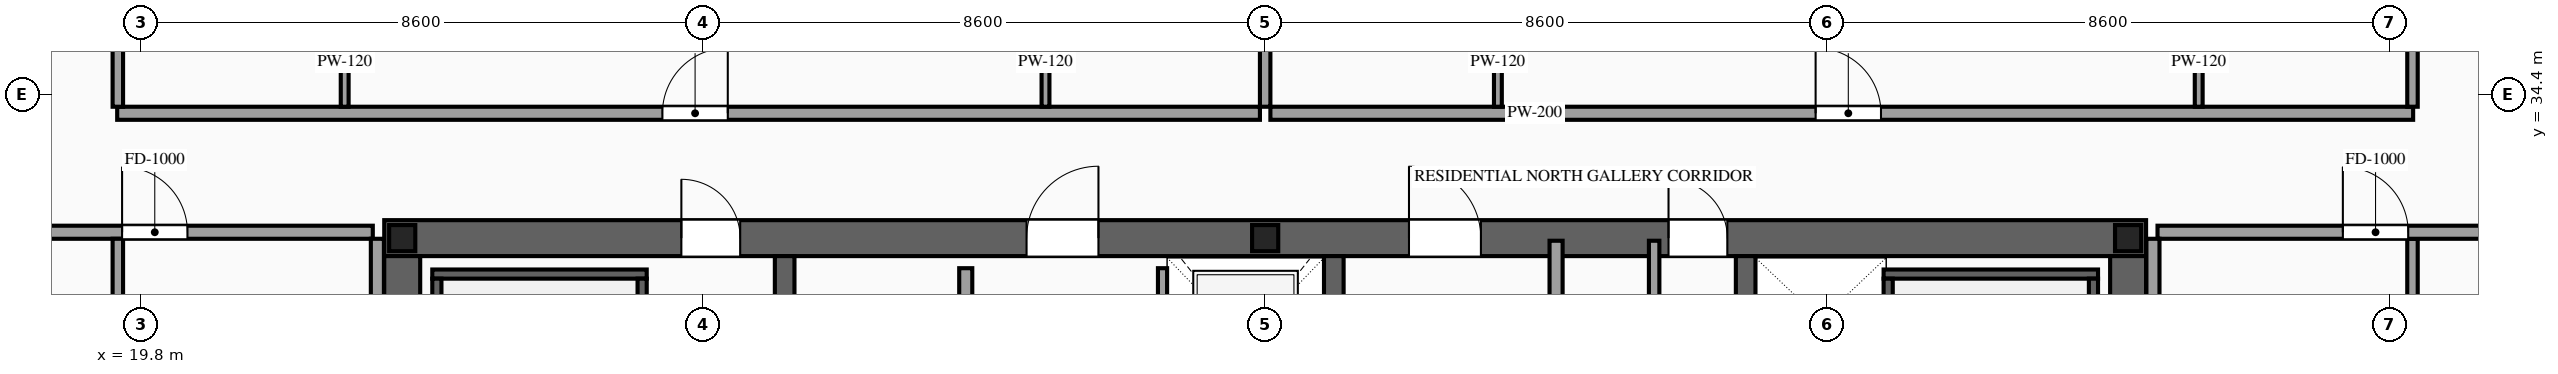
"""IFC4 building model, lengths in metres.
Left out: names, types, materials, properties, quantities, classifications, styles, units other than length and angle.
Written with IfcOpenShell. Run it as: python <this file> out.ifc"""

import sys

from ifc_helpers import new_model, si_unit, direction, frame, frame_2d, origin, origin_2d, place, context, subcontext, project, spatial, rectangle, i_section, extrude, source, transform, mapped, element, fill, save


model = new_model("IFC4")
c1 = context("Model", 3, precision=1e-05, world=origin(), true_north=direction((0.0, 1.0)))
c2 = subcontext(c1, "Body", "Model", "MODEL_VIEW")
j1 = project(units=[si_unit("LENGTHUNIT", "METRE"), si_unit("PLANEANGLEUNIT", "RADIAN")], contexts=[c1])
p1 = place(None, origin())
s1 = spatial("IfcSite", under=j1, at=p1, CompositionType="ELEMENT")
p2 = place(p1, origin())
s2 = spatial("IfcBuilding", under=s1, at=p2, CompositionType="ELEMENT")
p3 = place(p2, frame((0.0, 0.0, 224.1)))
s3 = spatial("IfcBuildingStorey", under=s2, at=p3, CompositionType="ELEMENT", Elevation=224.1)
p4 = place(p3, frame((23.525, 32.2, 0.0), z_axis=(0.0, 0.0, 1.0), x_axis=(1.0, 0.0, 0.0)))
e1 = element("IfcWall", 1, at=p4, inside=s3, PredefinedType="SHEAR", context=c2, shape_type="SweptSolid", body=[
    extrude(rectangle(XDim=26.95, YDim=0.55, at=frame_2d((13.475, 0.0))), origin(), (0.0, 0.0, 1.0), 3.5),
])
p5 = place(p4, frame((4.545, 0.0, 0.0)))
e2 = element("IfcOpeningElement", 2, at=p5, cuts=e1, PredefinedType="OPENING", context=c2, shape_type="SweptSolid", body=[
    extrude(rectangle(XDim=0.9, YDim=2.15, at=frame_2d((0.45, 1.075))), frame((0.0, 0.29, 0.0), z_axis=(0.0, -1.0, 0.0), x_axis=(1.0, 0.0, 0.0)), (0.0, 0.0, 1.0), 0.58),
])
p6 = place(p4, frame((9.825, 0.0, 0.0)))
e3 = element("IfcOpeningElement", 3, at=p6, cuts=e1, PredefinedType="OPENING", context=c2, shape_type="SweptSolid", body=[
    extrude(rectangle(XDim=1.1, YDim=2.2, at=frame_2d((0.55, 1.1))), frame((0.0, 0.29, 0.0), z_axis=(0.0, -1.0, 0.0), x_axis=(1.0, 0.0, 0.0)), (0.0, 0.0, 1.0), 0.58),
])
p7 = place(p4, frame((15.675, 0.0, 0.0)))
e4 = element("IfcOpeningElement", 4, at=p7, cuts=e1, PredefinedType="OPENING", context=c2, shape_type="SweptSolid", body=[
    extrude(rectangle(XDim=1.1, YDim=2.2, at=frame_2d((0.55, 1.1))), frame((0.0, 0.29, 0.0), z_axis=(0.0, -1.0, 0.0), x_axis=(1.0, 0.0, 0.0)), (0.0, 0.0, 1.0), 0.58),
])
p8 = place(p4, frame((19.645, 0.0, 0.0)))
e5 = element("IfcOpeningElement", 5, at=p8, cuts=e1, PredefinedType="OPENING", context=c2, shape_type="SweptSolid", body=[
    extrude(rectangle(XDim=0.9, YDim=2.15, at=frame_2d((0.45, 1.075))), frame((0.0, 0.29, 0.0), z_axis=(0.0, -1.0, 0.0), x_axis=(1.0, 0.0, 0.0)), (0.0, 0.0, 1.0), 0.58),
])
m1 = source(origin(), c2, "Body", "SweptSolid", [
    extrude(rectangle(XDim=12.25, YDim=0.55, at=frame_2d((6.125, 0.0))), origin(), (0.0, 0.0, 1.0), 3.5),
])
for number, where, z_axis, x_axis in (
    (6, (23.8, 19.675, 0.0), (0.0, 0.0, 1.0), (0.0, 1.0, 0.0)),
    (7, (50.2, 19.675, 0.0), (0.0, 0.0, 1.0), (0.0, 1.0, 0.0)),
):
    element("IfcWall", number, at=place(p3, frame(where, z_axis=z_axis, x_axis=x_axis)), inside=s3, PredefinedType="SHEAR", context=c2, shape_type="MappedRepresentation", body=[
        mapped(m1, transform((0.0, 0.0, 0.0), scale=1.0)),
    ])
m2 = source(origin(), c2, "Body", "SweptSolid", [
    extrude(rectangle(XDim=12.25, YDim=0.3, at=frame_2d((6.125, 0.0))), origin(), (0.0, 0.0, 1.0), 3.5),
])
for number, where, z_axis, x_axis in (
    (8, (29.65, 19.675, 0.0), (0.0, 0.0, 1.0), (0.0, 1.0, 0.0)),
    (9, (38.05, 19.675, 0.0), (0.0, 0.0, 1.0), (0.0, 1.0, 0.0)),
    (10, (44.35, 19.675, 0.0), (0.0, 0.0, 1.0), (0.0, 1.0, 0.0)),
):
    element("IfcWall", number, at=place(p3, frame(where, z_axis=z_axis, x_axis=x_axis)), inside=s3, PredefinedType="SOLIDWALL", context=c2, shape_type="MappedRepresentation", body=[
        mapped(m2, transform((0.0, 0.0, 0.0), scale=1.0)),
    ])
m3 = source(origin(), c2, "Body", "SweptSolid", [
    extrude(i_section(OverallWidth=0.4, OverallDepth=0.4, WebThickness=0.013, FlangeThickness=0.021, at=origin_2d()), origin(), (0.0, 0.0, 1.0), 3.5),
])
for number, where, z_axis, x_axis in (
    (11, (23.8, 32.2, 0.0), (0.0, 0.0, 1.0), (1.0, 0.0, 0.0)),
    (12, (37.0, 32.2, 0.0), (0.0, 0.0, 1.0), (1.0, 0.0, 0.0)),
    (13, (50.2, 32.2, 0.0), (0.0, 0.0, 1.0), (1.0, 0.0, 0.0)),
):
    element("IfcColumn", number, at=place(p3, frame(where, z_axis=z_axis, x_axis=x_axis)), inside=s3, PredefinedType="COLUMN", context=c2, shape_type="MappedRepresentation", body=[
        mapped(m3, transform((0.0, 0.0, 0.0), scale=1.0)),
    ])
p9 = place(p3, frame((35.43, 29.4, 0.0), z_axis=(0.0, 0.0, 1.0), x_axis=(0.0, 1.0, 0.0)))
e14 = element("IfcWall", 14, at=p9, inside=s3, PredefinedType="SOLIDWALL", context=c2, shape_type="SweptSolid", body=[
    extrude(rectangle(XDim=2.34, YDim=0.14, at=frame_2d((1.17, 0.0))), origin(), (0.0, 0.0, 1.0), 3.28),
])
p10 = place(p9, frame((0.62, 0.0, 0.0)))
e15 = element("IfcOpeningElement", 15, at=p10, cuts=e14, PredefinedType="OPENING", context=c2, shape_type="SweptSolid", body=[
    extrude(rectangle(XDim=1.1, YDim=2.2, at=frame_2d((0.55, 1.1))), frame((0.0, 0.085, 0.0), z_axis=(0.0, -1.0, 0.0), x_axis=(1.0, 0.0, 0.0)), (0.0, 0.0, 1.0), 0.17),
])
m4 = source(origin(), c2, "Body", "SweptSolid", [
    extrude(rectangle(XDim=3.28, YDim=0.14, at=frame_2d((1.64, 0.0))), origin(), (0.0, 0.0, 1.0), 3.28),
])
p11 = place(p3, frame((24.26, 31.65, 0.0), z_axis=(0.0, 0.0, 1.0), x_axis=(1.0, 0.0, 0.0)))
e16 = element("IfcWall", 16, at=p11, inside=s3, PredefinedType="SOLIDWALL", context=c2, shape_type="MappedRepresentation", body=[
    mapped(m4, transform((0.0, 0.0, 0.0), scale=1.0)),
])
m5 = source(origin(), c2, "Body", "SweptSolid", [
    extrude(rectangle(XDim=8.94, YDim=0.14, at=frame_2d((4.47, 0.0))), origin(), (0.0, 0.0, 1.0), 3.28),
])
for number, where, z_axis, x_axis in (
    (17, (24.33, 22.64, 0.0), (0.0, 0.0, 1.0), (0.0, 1.0, 0.0)),
    (18, (27.47, 22.64, 0.0), (0.0, 0.0, 1.0), (0.0, 1.0, 0.0)),
):
    element("IfcWall", number, at=place(p3, frame(where, z_axis=z_axis, x_axis=x_axis)), inside=s3, PredefinedType="SOLIDWALL", context=c2, shape_type="MappedRepresentation", body=[
        mapped(m5, transform((0.0, 0.0, 0.0), scale=1.0)),
    ])
p12 = place(p3, frame((46.46, 31.65, 0.0), z_axis=(0.0, 0.0, 1.0), x_axis=(1.0, 0.0, 0.0)))
e19 = element("IfcWall", 19, at=p12, inside=s3, PredefinedType="SOLIDWALL", context=c2, shape_type="MappedRepresentation", body=[
    mapped(m4, transform((0.0, 0.0, 0.0), scale=1.0)),
])
for number, where, z_axis, x_axis in (
    (20, (46.53, 22.64, 0.0), (0.0, 0.0, 1.0), (0.0, 1.0, 0.0)),
    (21, (49.67, 22.64, 0.0), (0.0, 0.0, 1.0), (0.0, 1.0, 0.0)),
):
    element("IfcWall", number, at=place(p3, frame(where, z_axis=z_axis, x_axis=x_axis)), inside=s3, PredefinedType="SOLIDWALL", context=c2, shape_type="MappedRepresentation", body=[
        mapped(m5, transform((0.0, 0.0, 0.0), scale=1.0)),
    ])
p13 = place(p3, frame((32.42, 25.92, 0.0), z_axis=(0.0, 0.0, 1.0), x_axis=(0.0, 1.0, 0.0)))
e22 = element("IfcWall", 22, at=p13, inside=s3, PredefinedType="PARTITIONING", context=c2, shape_type="SweptSolid", body=[
    extrude(rectangle(XDim=5.82, YDim=0.2, at=frame_2d((2.91, 0.0))), origin(), (0.0, 0.0, 1.0), 3.28),
])
p14 = place(p13, frame((2.46, 0.0, 0.0)))
e23 = element("IfcOpeningElement", 23, at=p14, cuts=e22, PredefinedType="OPENING", context=c2, shape_type="SweptSolid", body=[
    extrude(rectangle(XDim=0.9, YDim=2.15, at=frame_2d((0.45, 1.075))), frame((0.0, 0.115, 0.0), z_axis=(0.0, -1.0, 0.0), x_axis=(1.0, 0.0, 0.0)), (0.0, 0.0, 1.0), 0.23),
])
m6 = source(origin(), c2, "Body", "SweptSolid", [
    extrude(rectangle(XDim=12.72, YDim=0.2, at=frame_2d((6.36, 0.0))), origin(), (0.0, 0.0, 1.0), 3.28),
])
p15 = place(p3, frame((41.45, 19.44, 0.0), z_axis=(0.0, 0.0, 1.0), x_axis=(0.0, 1.0, 0.0)))
e24 = element("IfcWall", 24, at=p15, inside=s3, PredefinedType="PARTITIONING", context=c2, shape_type="MappedRepresentation", body=[
    mapped(m6, transform((0.0, 0.0, 0.0), scale=1.0)),
])
m7 = source(origin(), c2, "Body", "SweptSolid", [
    extrude(rectangle(XDim=10.72, YDim=0.16, at=frame_2d((5.36, 0.0))), origin(), (0.0, 0.0, 1.0), 3.28),
])
p16 = place(p3, frame((42.95, 21.44, 0.0), z_axis=(0.0, 0.0, 1.0), x_axis=(0.0, 1.0, 0.0)))
e25 = element("IfcWall", 25, at=p16, inside=s3, PredefinedType="PARTITIONING", context=c2, shape_type="MappedRepresentation", body=[
    mapped(m7, transform((0.0, 0.0, 0.0), scale=1.0)),
])
p17 = place(p3, frame((19.44, 34.11, 0.0), z_axis=(0.0, 0.0, 1.0), x_axis=(1.0, 0.0, 0.0)))
e26 = element("IfcWall", 26, at=p17, inside=s3, PredefinedType="PARTITIONING", context=c2, shape_type="SweptSolid", body=[
    extrude(rectangle(XDim=17.48, YDim=0.2, at=frame_2d((8.74, 0.0))), origin(), (0.0, 0.0, 1.0), 3.28),
])
p18 = place(p17, frame((8.34, 0.0, 0.0)))
e27 = element("IfcOpeningElement", 27, at=p18, cuts=e26, PredefinedType="OPENING", context=c2, shape_type="SweptSolid", body=[
    extrude(rectangle(XDim=1.0, YDim=2.2, at=frame_2d((0.5, 1.1))), frame((0.0, 0.115, 0.0), z_axis=(0.0, -1.0, 0.0), x_axis=(1.0, 0.0, 0.0)), (0.0, 0.0, 1.0), 0.23),
])
m8 = source(origin(), c2, "Body", "SweptSolid", [
    extrude(rectangle(XDim=12.04, YDim=0.16, at=frame_2d((6.02, 0.0))), origin(), (0.0, 0.0, 1.0), 2.787),
])
p19 = place(p3, frame((37.0, 34.21, 0.0), z_axis=(0.0, 0.0, 1.0), x_axis=(0.0, 1.0, 0.0)))
e28 = element("IfcWall", 28, at=p19, inside=s3, PredefinedType="PARTITIONING", context=c2, shape_type="MappedRepresentation", body=[
    mapped(m8, transform((0.0, 0.0, 0.0), scale=1.0)),
])
p20 = place(p3, frame((22.92, 34.21, 0.0), z_axis=(0.0, 0.0, 1.0), x_axis=(0.0, 1.0, 0.0)))
e29 = element("IfcWall", 29, at=p20, inside=s3, PredefinedType="PARTITIONING", context=c2, shape_type="SweptSolid", body=[
    extrude(rectangle(XDim=4.11, YDim=0.12, at=frame_2d((2.055, 0.0))), origin(), (0.0, 0.0, 1.0), 3.28),
])
p21 = place(p20, frame((1.63, 0.0, 0.0)))
e30 = element("IfcOpeningElement", 30, at=p21, cuts=e29, PredefinedType="OPENING", context=c2, shape_type="SweptSolid", body=[
    extrude(rectangle(XDim=0.85, YDim=2.1, at=frame_2d((0.425, 1.05))), frame((0.0, 0.075, 0.0), z_axis=(0.0, -1.0, 0.0), x_axis=(1.0, 0.0, 0.0)), (0.0, 0.0, 1.0), 0.15),
])
p22 = place(p3, frame((33.64, 34.21, 0.0), z_axis=(0.0, 0.0, 1.0), x_axis=(0.0, 1.0, 0.0)))
e31 = element("IfcWall", 31, at=p22, inside=s3, PredefinedType="PARTITIONING", context=c2, shape_type="SweptSolid", body=[
    extrude(rectangle(XDim=4.11, YDim=0.12, at=frame_2d((2.055, 0.0))), origin(), (0.0, 0.0, 1.0), 3.28),
])
p23 = place(p22, frame((1.63, 0.0, 0.0)))
e32 = element("IfcOpeningElement", 32, at=p23, cuts=e31, PredefinedType="OPENING", context=c2, shape_type="SweptSolid", body=[
    extrude(rectangle(XDim=0.85, YDim=2.1, at=frame_2d((0.425, 1.05))), frame((0.0, 0.075, 0.0), z_axis=(0.0, -1.0, 0.0), x_axis=(1.0, 0.0, 0.0)), (0.0, 0.0, 1.0), 0.15),
])
p24 = place(p3, frame((37.08, 34.11, 0.0), z_axis=(0.0, 0.0, 1.0), x_axis=(1.0, 0.0, 0.0)))
e33 = element("IfcWall", 33, at=p24, inside=s3, PredefinedType="PARTITIONING", context=c2, shape_type="SweptSolid", body=[
    extrude(rectangle(XDim=17.48, YDim=0.2, at=frame_2d((8.74, 0.0))), origin(), (0.0, 0.0, 1.0), 3.28),
])
p25 = place(p24, frame((8.34, 0.0, 0.0)))
e34 = element("IfcOpeningElement", 34, at=p25, cuts=e33, PredefinedType="OPENING", context=c2, shape_type="SweptSolid", body=[
    extrude(rectangle(XDim=1.0, YDim=2.2, at=frame_2d((0.5, 1.1))), frame((0.0, 0.115, 0.0), z_axis=(0.0, -1.0, 0.0), x_axis=(1.0, 0.0, 0.0)), (0.0, 0.0, 1.0), 0.23),
])
m9 = source(origin(), c2, "Body", "SweptSolid", [
    extrude(rectangle(XDim=11.89, YDim=0.16, at=frame_2d((5.945, 0.0))), origin(), (0.0, 0.0, 1.0), 3.28),
])
for number, where, z_axis, x_axis in (
    (35, (19.45, 34.21, 0.0), (0.0, 0.0, 1.0), (0.0, 1.0, 0.0)),
    (36, (54.55, 34.21, 0.0), (0.0, 0.0, 1.0), (0.0, 1.0, 0.0)),
):
    element("IfcWall", number, at=place(p3, frame(where, z_axis=z_axis, x_axis=x_axis)), inside=s3, PredefinedType="PARTITIONING", context=c2, shape_type="MappedRepresentation", body=[
        mapped(m9, transform((0.0, 0.0, 0.0), scale=1.0)),
    ])
p26 = place(p3, frame((40.56, 34.21, 0.0), z_axis=(0.0, 0.0, 1.0), x_axis=(0.0, 1.0, 0.0)))
e37 = element("IfcWall", 37, at=p26, inside=s3, PredefinedType="PARTITIONING", context=c2, shape_type="SweptSolid", body=[
    extrude(rectangle(XDim=4.11, YDim=0.12, at=frame_2d((2.055, 0.0))), origin(), (0.0, 0.0, 1.0), 3.28),
])
p27 = place(p26, frame((1.63, 0.0, 0.0)))
e38 = element("IfcOpeningElement", 38, at=p27, cuts=e37, PredefinedType="OPENING", context=c2, shape_type="SweptSolid", body=[
    extrude(rectangle(XDim=0.85, YDim=2.1, at=frame_2d((0.425, 1.05))), frame((0.0, 0.075, 0.0), z_axis=(0.0, -1.0, 0.0), x_axis=(1.0, 0.0, 0.0)), (0.0, 0.0, 1.0), 0.15),
])
p28 = place(p3, frame((51.28, 34.21, 0.0), z_axis=(0.0, 0.0, 1.0), x_axis=(0.0, 1.0, 0.0)))
e39 = element("IfcWall", 39, at=p28, inside=s3, PredefinedType="PARTITIONING", context=c2, shape_type="SweptSolid", body=[
    extrude(rectangle(XDim=4.11, YDim=0.12, at=frame_2d((2.055, 0.0))), origin(), (0.0, 0.0, 1.0), 3.28),
])
p29 = place(p28, frame((1.63, 0.0, 0.0)))
e40 = element("IfcOpeningElement", 40, at=p29, cuts=e39, PredefinedType="OPENING", context=c2, shape_type="SweptSolid", body=[
    extrude(rectangle(XDim=0.85, YDim=2.1, at=frame_2d((0.425, 1.05))), frame((0.0, 0.075, 0.0), z_axis=(0.0, -1.0, 0.0), x_axis=(1.0, 0.0, 0.0)), (0.0, 0.0, 1.0), 0.15),
])
p30 = place(p3, frame((16.55, 32.29, 0.0), z_axis=(0.0, 0.0, 1.0), x_axis=(1.0, 0.0, 0.0)))
e41 = element("IfcWall", 41, at=p30, inside=s3, PredefinedType="PARTITIONING", context=c2, shape_type="SweptSolid", body=[
    extrude(rectangle(XDim=6.8, YDim=0.2, at=frame_2d((3.4, 0.0))), origin(), (0.0, 0.0, 1.0), 2.825),
])
p31 = place(p30, frame((2.965, 0.0, 0.0)))
e42 = element("IfcOpeningElement", 42, at=p31, cuts=e41, PredefinedType="OPENING", context=c2, shape_type="SweptSolid", body=[
    extrude(rectangle(XDim=1.0, YDim=2.2, at=frame_2d((0.5, 1.1))), frame((0.0, 0.115, 0.0), z_axis=(0.0, -1.0, 0.0), x_axis=(1.0, 0.0, 0.0)), (0.0, 0.0, 1.0), 0.23),
])
m10 = source(origin(), c2, "Body", "SweptSolid", [
    extrude(rectangle(XDim=26.69, YDim=0.16, at=frame_2d((13.345, 0.0))), origin(), (0.0, 0.0, 1.0), 3.28),
])
for number, where, z_axis, x_axis in (
    (43, (19.45, 5.5, 0.0), (0.0, 0.0, 1.0), (0.0, 1.0, 0.0)),
    (44, (54.55, 5.5, 0.0), (0.0, 0.0, 1.0), (0.0, 1.0, 0.0)),
):
    element("IfcWall", number, at=place(p3, frame(where, z_axis=z_axis, x_axis=x_axis)), inside=s3, PredefinedType="PARTITIONING", context=c2, shape_type="MappedRepresentation", body=[
        mapped(m10, transform((0.0, 0.0, 0.0), scale=1.0)),
    ])
m11 = source(origin(), c2, "Body", "SweptSolid", [
    extrude(rectangle(XDim=6.29, YDim=0.2, at=frame_2d((3.145, 0.0))), origin(), (0.0, 0.0, 1.0), 3.28),
])
p32 = place(p3, frame((23.42, 25.9, 0.0), z_axis=(0.0, 0.0, 1.0), x_axis=(0.0, 1.0, 0.0)))
e45 = element("IfcWall", 45, at=p32, inside=s3, PredefinedType="PARTITIONING", context=c2, shape_type="MappedRepresentation", body=[
    mapped(m11, transform((0.0, 0.0, 0.0), scale=1.0)),
])
p33 = place(p3, frame((50.65, 32.29, 0.0), z_axis=(0.0, 0.0, 1.0), x_axis=(1.0, 0.0, 0.0)))
e46 = element("IfcWall", 46, at=p33, inside=s3, PredefinedType="PARTITIONING", context=c2, shape_type="SweptSolid", body=[
    extrude(rectangle(XDim=6.8, YDim=0.2, at=frame_2d((3.4, 0.0))), origin(), (0.0, 0.0, 1.0), 2.825),
])
p34 = place(p33, frame((2.835, 0.0, 0.0)))
e47 = element("IfcOpeningElement", 47, at=p34, cuts=e46, PredefinedType="OPENING", context=c2, shape_type="SweptSolid", body=[
    extrude(rectangle(XDim=1.0, YDim=2.2, at=frame_2d((0.5, 1.1))), frame((0.0, 0.115, 0.0), z_axis=(0.0, -1.0, 0.0), x_axis=(1.0, 0.0, 0.0)), (0.0, 0.0, 1.0), 0.23),
])
p35 = place(p3, frame((50.58, 25.9, 0.0), z_axis=(0.0, 0.0, 1.0), x_axis=(0.0, 1.0, 0.0)))
e48 = element("IfcWall", 48, at=p35, inside=s3, PredefinedType="PARTITIONING", context=c2, shape_type="MappedRepresentation", body=[
    mapped(m11, transform((0.0, 0.0, 0.0), scale=1.0)),
])
m12 = source(origin(), c2, "Body", "SweptSolid", [
    extrude(rectangle(XDim=0.9, YDim=2.15, at=frame_2d((0.45, 1.075))), frame((0.0, 0.025, 0.0), z_axis=(0.0, -1.0, 0.0), x_axis=(1.0, 0.0, 0.0)), (0.0, 0.0, 1.0), 0.05),
])
p36 = place(p5, origin())
e49 = element("IfcDoor", 49, at=p36, inside=s3, OperationType="SINGLE_SWING_LEFT", PredefinedType="DOOR", context=c2, shape_type="MappedRepresentation", body=[
    mapped(m12, transform((0.0, 0.0, 0.0), scale=1.0)),
])
fill(e2, e49)
m13 = source(origin(), c2, "Body", "SweptSolid", [
    extrude(rectangle(XDim=1.1, YDim=2.2, at=frame_2d((0.55, 1.1))), frame((0.0, 0.025, 0.0), z_axis=(0.0, -1.0, 0.0), x_axis=(1.0, 0.0, 0.0)), (0.0, 0.0, 1.0), 0.05),
])
p37 = place(p6, origin())
e50 = element("IfcDoor", 50, at=p37, inside=s3, OperationType="SINGLE_SWING_RIGHT", PredefinedType="DOOR", context=c2, shape_type="MappedRepresentation", body=[
    mapped(m13, transform((0.0, 0.0, 0.0), scale=1.0)),
])
fill(e3, e50)
p38 = place(p7, origin())
e51 = element("IfcDoor", 51, at=p38, inside=s3, OperationType="SINGLE_SWING_LEFT", PredefinedType="DOOR", context=c2, shape_type="MappedRepresentation", body=[
    mapped(m13, transform((0.0, 0.0, 0.0), scale=1.0)),
])
fill(e4, e51)
p39 = place(p8, origin())
e52 = element("IfcDoor", 52, at=p39, inside=s3, OperationType="SINGLE_SWING_LEFT", PredefinedType="DOOR", context=c2, shape_type="MappedRepresentation", body=[
    mapped(m12, transform((0.0, 0.0, 0.0), scale=1.0)),
])
fill(e5, e52)
m14 = source(origin(), c2, "Body", "SweptSolid", [
    extrude(rectangle(XDim=1.0, YDim=2.2, at=frame_2d((0.5, 1.1))), frame((0.0, 0.025, 0.0), z_axis=(0.0, -1.0, 0.0), x_axis=(1.0, 0.0, 0.0)), (0.0, 0.0, 1.0), 0.05),
])
p40 = place(p18, origin())
e53 = element("IfcDoor", 53, at=p40, inside=s3, OperationType="SINGLE_SWING_RIGHT", PredefinedType="DOOR", context=c2, shape_type="MappedRepresentation", body=[
    mapped(m14, transform((0.0, 0.0, 0.0), scale=1.0)),
])
fill(e27, e53)
p41 = place(p25, origin())
e54 = element("IfcDoor", 54, at=p41, inside=s3, OperationType="SINGLE_SWING_LEFT", PredefinedType="DOOR", context=c2, shape_type="MappedRepresentation", body=[
    mapped(m14, transform((0.0, 0.0, 0.0), scale=1.0)),
])
fill(e34, e54)
p42 = place(p31, origin())
e55 = element("IfcDoor", 55, at=p42, inside=s3, OperationType="SINGLE_SWING_LEFT", PredefinedType="DOOR", context=c2, shape_type="MappedRepresentation", body=[
    mapped(m14, transform((0.0, 0.0, 0.0), scale=1.0)),
])
fill(e42, e55)
p43 = place(p34, origin())
e56 = element("IfcDoor", 56, at=p43, inside=s3, OperationType="SINGLE_SWING_LEFT", PredefinedType="DOOR", context=c2, shape_type="MappedRepresentation", body=[
    mapped(m14, transform((0.0, 0.0, 0.0), scale=1.0)),
])
fill(e47, e56)
save(model, sys.argv[1])
